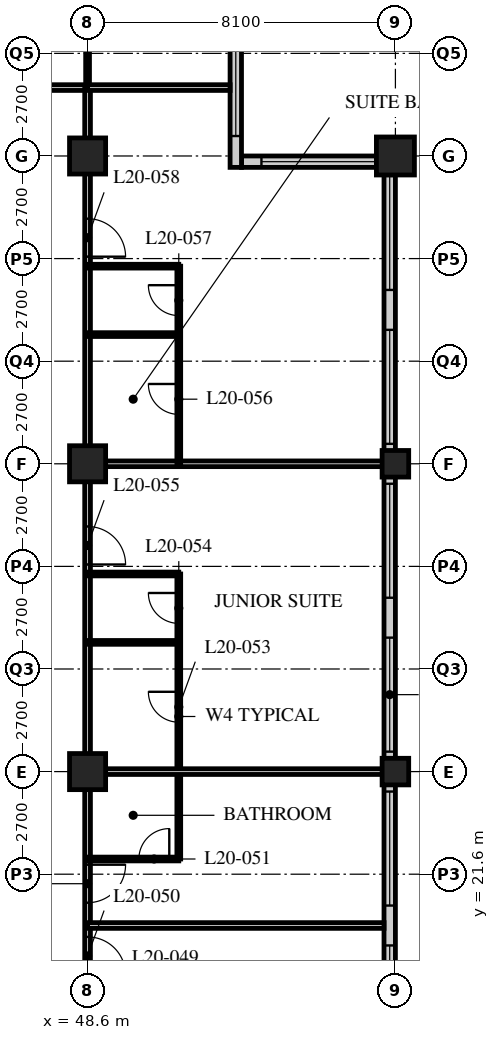
"""IFC4 building model, lengths in metres.
Left out: names, types, materials, properties, quantities, classifications, styles, units other than length and angle.
Written with IfcOpenShell. Run it as: python <this file> out.ifc"""

import sys

from ifc_helpers import new_model, si_unit, direction, frame, frame_2d, origin, origin_2d, place, context, subcontext, project, spatial, rectangle, hollow_rectangle, extrude, element, fill, save


model = new_model("IFC4")
c1 = context("Model", 3, precision=1e-05, world=origin(), true_north=direction((0.0, 1.0)))
c2 = subcontext(c1, "Body", "Model", "MODEL_VIEW")
j1 = project(units=[si_unit("LENGTHUNIT", "METRE"), si_unit("PLANEANGLEUNIT", "RADIAN")], contexts=[c1])
p1 = place(None, origin())
s1 = spatial("IfcSite", under=j1, at=p1, CompositionType="ELEMENT")
p2 = place(p1, origin())
s2 = spatial("IfcBuilding", under=s1, at=p2, CompositionType="ELEMENT")
p3 = place(p2, frame((0.0, 0.0, 80.6)))
s3 = spatial("IfcBuildingStorey", under=s2, at=p3, CompositionType="ELEMENT", Elevation=80.6)
for number, where, z_axis, x_axis in (
    (1, (48.6, 24.3, 0.0), (0.0, 0.0, 1.0), (1.0, 0.0, 0.0)),
    (2, (48.6, 32.4, 0.0), (0.0, 0.0, 1.0), (1.0, 0.0, 0.0)),
    (3, (48.6, 40.5, 0.0), (0.0, 0.0, 1.0), (1.0, 0.0, 0.0)),
):
    element("IfcColumn", number, at=place(p3, frame(where, z_axis=z_axis, x_axis=x_axis)), inside=s3, PredefinedType="COLUMN", context=c2, shape_type="SweptSolid", body=[
        extrude(hollow_rectangle(XDim=0.95, YDim=0.95, WallThickness=0.095, at=origin_2d()), origin(), (0.0, 0.0, 1.0), 3.4),
    ])
for number, where, z_axis, x_axis in (
    (4, (56.7, 24.3, 0.0), (0.0, 0.0, 1.0), (1.0, 0.0, 0.0)),
    (5, (56.7, 32.4, 0.0), (0.0, 0.0, 1.0), (1.0, 0.0, 0.0)),
):
    element("IfcColumn", number, at=place(p3, frame(where, z_axis=z_axis, x_axis=x_axis)), inside=s3, PredefinedType="COLUMN", context=c2, shape_type="SweptSolid", body=[
        extrude(hollow_rectangle(XDim=0.7, YDim=0.7, WallThickness=0.06, at=origin_2d()), origin(), (0.0, 0.0, 1.0), 3.4),
    ])
p4 = place(p3, frame((56.7, 40.5, 0.0), z_axis=(0.0, 0.0, 1.0), x_axis=(1.0, 0.0, 0.0)))
e6 = element("IfcColumn", 6, at=p4, inside=s3, PredefinedType="COLUMN", context=c2, shape_type="SweptSolid", body=[
    extrude(hollow_rectangle(XDim=1.0, YDim=1.0, WallThickness=0.1, at=origin_2d()), origin(), (0.0, 0.0, 1.0), 3.4),
])
p5 = place(p3, frame((56.55, 8.4, 0.0), z_axis=(0.0, 0.0, 1.0), x_axis=(0.0, 1.0, 0.0)))
e7 = element("IfcWall", 7, at=p5, inside=s3, PredefinedType="SOLIDWALL", context=c2, shape_type="SweptSolid", body=[
    extrude(rectangle(XDim=32.1, YDim=0.3, at=frame_2d((16.05, 0.0))), origin(), (0.0, 0.0, 1.0), 3.19),
])
p6 = place(p5, frame((0.225, 0.0, 0.9)))
e8 = element("IfcOpeningElement", 8, at=p6, cuts=e7, PredefinedType="OPENING", context=c2, shape_type="SweptSolid", body=[
    extrude(rectangle(XDim=3.0, YDim=1.5, at=frame_2d((1.5, 0.75))), frame((0.0, 0.16, 0.0), z_axis=(0.0, -1.0, 0.0), x_axis=(1.0, 0.0, 0.0)), (0.0, 0.0, 1.0), 0.32),
])
p7 = place(p5, frame((4.275, 0.0, 0.9)))
e9 = element("IfcOpeningElement", 9, at=p7, cuts=e7, PredefinedType="OPENING", context=c2, shape_type="SweptSolid", body=[
    extrude(rectangle(XDim=3.0, YDim=1.5, at=frame_2d((1.5, 0.75))), frame((0.0, 0.16, 0.0), z_axis=(0.0, -1.0, 0.0), x_axis=(1.0, 0.0, 0.0)), (0.0, 0.0, 1.0), 0.32),
])
p8 = place(p5, frame((8.325, 0.0, 0.9)))
e10 = element("IfcOpeningElement", 10, at=p8, cuts=e7, PredefinedType="OPENING", context=c2, shape_type="SweptSolid", body=[
    extrude(rectangle(XDim=3.0, YDim=1.5, at=frame_2d((1.5, 0.75))), frame((0.0, 0.16, 0.0), z_axis=(0.0, -1.0, 0.0), x_axis=(1.0, 0.0, 0.0)), (0.0, 0.0, 1.0), 0.32),
])
p9 = place(p5, frame((12.375, 0.0, 0.9)))
e11 = element("IfcOpeningElement", 11, at=p9, cuts=e7, PredefinedType="OPENING", context=c2, shape_type="SweptSolid", body=[
    extrude(rectangle(XDim=3.0, YDim=1.5, at=frame_2d((1.5, 0.75))), frame((0.0, 0.16, 0.0), z_axis=(0.0, -1.0, 0.0), x_axis=(1.0, 0.0, 0.0)), (0.0, 0.0, 1.0), 0.32),
])
p10 = place(p5, frame((16.425, 0.0, 0.9)))
e12 = element("IfcOpeningElement", 12, at=p10, cuts=e7, PredefinedType="OPENING", context=c2, shape_type="SweptSolid", body=[
    extrude(rectangle(XDim=3.0, YDim=1.5, at=frame_2d((1.5, 0.75))), frame((0.0, 0.16, 0.0), z_axis=(0.0, -1.0, 0.0), x_axis=(1.0, 0.0, 0.0)), (0.0, 0.0, 1.0), 0.32),
])
p11 = place(p5, frame((20.475, 0.0, 0.9)))
e13 = element("IfcOpeningElement", 13, at=p11, cuts=e7, PredefinedType="OPENING", context=c2, shape_type="SweptSolid", body=[
    extrude(rectangle(XDim=3.0, YDim=1.5, at=frame_2d((1.5, 0.75))), frame((0.0, 0.16, 0.0), z_axis=(0.0, -1.0, 0.0), x_axis=(1.0, 0.0, 0.0)), (0.0, 0.0, 1.0), 0.32),
])
p12 = place(p5, frame((24.525, 0.0, 0.9)))
e14 = element("IfcOpeningElement", 14, at=p12, cuts=e7, PredefinedType="OPENING", context=c2, shape_type="SweptSolid", body=[
    extrude(rectangle(XDim=3.0, YDim=1.5, at=frame_2d((1.5, 0.75))), frame((0.0, 0.16, 0.0), z_axis=(0.0, -1.0, 0.0), x_axis=(1.0, 0.0, 0.0)), (0.0, 0.0, 1.0), 0.32),
])
p13 = place(p5, frame((28.575, 0.0, 0.9)))
e15 = element("IfcOpeningElement", 15, at=p13, cuts=e7, PredefinedType="OPENING", context=c2, shape_type="SweptSolid", body=[
    extrude(rectangle(XDim=3.0, YDim=1.5, at=frame_2d((1.5, 0.75))), frame((0.0, 0.16, 0.0), z_axis=(0.0, -1.0, 0.0), x_axis=(1.0, 0.0, 0.0)), (0.0, 0.0, 1.0), 0.32),
])
p14 = place(p3, frame((56.4, 40.35, 0.0), z_axis=(0.0, 0.0, 1.0), x_axis=(-1.0, 0.0, 0.0)))
e16 = element("IfcWall", 16, at=p14, inside=s3, PredefinedType="SOLIDWALL", context=c2, shape_type="SweptSolid", body=[
    extrude(rectangle(XDim=3.75, YDim=0.3, at=frame_2d((1.875, 0.0))), origin(), (0.0, 0.0, 1.0), 3.19),
])
p15 = place(p14, frame((0.225, 0.0, 0.9)))
e17 = element("IfcOpeningElement", 17, at=p15, cuts=e16, PredefinedType="OPENING", context=c2, shape_type="SweptSolid", body=[
    extrude(rectangle(XDim=3.0, YDim=1.5, at=frame_2d((1.5, 0.75))), frame((0.0, 0.16, 0.0), z_axis=(0.0, -1.0, 0.0), x_axis=(1.0, 0.0, 0.0)), (0.0, 0.0, 1.0), 0.32),
])
p16 = place(p3, frame((52.5, 40.2, 0.0), z_axis=(0.0, 0.0, 1.0), x_axis=(0.0, 1.0, 0.0)))
e18 = element("IfcWall", 18, at=p16, inside=s3, PredefinedType="SOLIDWALL", context=c2, shape_type="SweptSolid", body=[
    extrude(rectangle(XDim=4.35, YDim=0.3, at=frame_2d((2.175, 0.0))), origin(), (0.0, 0.0, 1.0), 3.19),
])
p17 = place(p16, frame((0.825, 0.0, 0.9)))
e19 = element("IfcOpeningElement", 19, at=p17, cuts=e18, PredefinedType="OPENING", context=c2, shape_type="SweptSolid", body=[
    extrude(rectangle(XDim=3.0, YDim=1.5, at=frame_2d((1.5, 0.75))), frame((0.0, 0.16, 0.0), z_axis=(0.0, -1.0, 0.0), x_axis=(1.0, 0.0, 0.0)), (0.0, 0.0, 1.0), 0.32),
])
p18 = place(p3, frame((12.15, 42.3, 0.0), z_axis=(0.0, 0.0, 1.0), x_axis=(1.0, 0.0, 0.0)))
e20 = element("IfcWall", 20, at=p18, inside=s3, PredefinedType="PARTITIONING", context=c2, shape_type="SweptSolid", body=[
    extrude(rectangle(XDim=36.45, YDim=0.15, at=frame_2d((18.225, 0.0))), origin(), (0.0, 0.0, 1.0), 3.19),
])
p19 = place(p18, frame((9.5, 0.0, 0.0)))
e21 = element("IfcOpeningElement", 21, at=p19, cuts=e20, PredefinedType="OPENING", context=c2, shape_type="SweptSolid", body=[
    extrude(rectangle(XDim=1.0, YDim=2.1, at=frame_2d((0.5, 1.05))), frame((0.0, 0.085, 0.0), z_axis=(0.0, -1.0, 0.0), x_axis=(1.0, 0.0, 0.0)), (0.0, 0.0, 1.0), 0.17),
])
p20 = place(p18, frame((17.6, 0.0, 0.0)))
e22 = element("IfcOpeningElement", 22, at=p20, cuts=e20, PredefinedType="OPENING", context=c2, shape_type="SweptSolid", body=[
    extrude(rectangle(XDim=1.0, YDim=2.1, at=frame_2d((0.5, 1.05))), frame((0.0, 0.085, 0.0), z_axis=(0.0, -1.0, 0.0), x_axis=(1.0, 0.0, 0.0)), (0.0, 0.0, 1.0), 0.17),
])
p21 = place(p18, frame((22.7, 0.0, 0.0)))
e23 = element("IfcOpeningElement", 23, at=p21, cuts=e20, PredefinedType="OPENING", context=c2, shape_type="SweptSolid", body=[
    extrude(rectangle(XDim=1.0, YDim=2.1, at=frame_2d((0.5, 1.05))), frame((0.0, 0.085, 0.0), z_axis=(0.0, -1.0, 0.0), x_axis=(1.0, 0.0, 0.0)), (0.0, 0.0, 1.0), 0.17),
])
p22 = place(p18, frame((26.75, 0.0, 0.0)))
e24 = element("IfcOpeningElement", 24, at=p22, cuts=e20, PredefinedType="OPENING", context=c2, shape_type="SweptSolid", body=[
    extrude(rectangle(XDim=1.0, YDim=2.1, at=frame_2d((0.5, 1.05))), frame((0.0, 0.085, 0.0), z_axis=(0.0, -1.0, 0.0), x_axis=(1.0, 0.0, 0.0)), (0.0, 0.0, 1.0), 0.17),
])
p23 = place(p18, frame((30.8, 0.0, 0.0)))
e25 = element("IfcOpeningElement", 25, at=p23, cuts=e20, PredefinedType="OPENING", context=c2, shape_type="SweptSolid", body=[
    extrude(rectangle(XDim=1.0, YDim=2.1, at=frame_2d((0.5, 1.05))), frame((0.0, 0.085, 0.0), z_axis=(0.0, -1.0, 0.0), x_axis=(1.0, 0.0, 0.0)), (0.0, 0.0, 1.0), 0.17),
])
p24 = place(p18, frame((32.825, 0.0, 0.0)))
e26 = element("IfcOpeningElement", 26, at=p24, cuts=e20, PredefinedType="OPENING", context=c2, shape_type="SweptSolid", body=[
    extrude(rectangle(XDim=1.0, YDim=2.1, at=frame_2d((0.5, 1.05))), frame((0.0, 0.085, 0.0), z_axis=(0.0, -1.0, 0.0), x_axis=(1.0, 0.0, 0.0)), (0.0, 0.0, 1.0), 0.17),
])
p25 = place(p18, frame((2.375, 0.0, 0.0)))
e27 = element("IfcOpeningElement", 27, at=p25, cuts=e20, PredefinedType="OPENING", context=c2, shape_type="SweptSolid", body=[
    extrude(rectangle(XDim=1.0, YDim=2.1, at=frame_2d((0.5, 1.05))), frame((0.0, 0.085, 0.0), z_axis=(0.0, -1.0, 0.0), x_axis=(1.0, 0.0, 0.0)), (0.0, 0.0, 1.0), 0.17),
])
p26 = place(p3, frame((48.6, 16.2, 0.0), z_axis=(0.0, 0.0, 1.0), x_axis=(0.0, 1.0, 0.0)))
e28 = element("IfcWall", 28, at=p26, inside=s3, PredefinedType="PARTITIONING", context=c2, shape_type="SweptSolid", body=[
    extrude(rectangle(XDim=26.1, YDim=0.15, at=frame_2d((13.05, 0.0))), origin(), (0.0, 0.0, 1.0), 2.428),
])
p27 = place(p26, frame((2.75, 0.0, 0.0)))
e29 = element("IfcOpeningElement", 29, at=p27, cuts=e28, PredefinedType="OPENING", context=c2, shape_type="SweptSolid", body=[
    extrude(rectangle(XDim=1.0, YDim=2.1, at=frame_2d((0.5, 1.05))), frame((0.0, 0.085, 0.0), z_axis=(0.0, -1.0, 0.0), x_axis=(1.0, 0.0, 0.0)), (0.0, 0.0, 1.0), 0.17),
])
p28 = place(p26, frame((4.65, 0.0, 0.0)))
e30 = element("IfcOpeningElement", 30, at=p28, cuts=e28, PredefinedType="OPENING", context=c2, shape_type="SweptSolid", body=[
    extrude(rectangle(XDim=1.0, YDim=2.1, at=frame_2d((0.5, 1.05))), frame((0.0, 0.085, 0.0), z_axis=(0.0, -1.0, 0.0), x_axis=(1.0, 0.0, 0.0)), (0.0, 0.0, 1.0), 0.17),
])
p29 = place(p26, frame((13.55, 0.0, 0.0)))
e31 = element("IfcOpeningElement", 31, at=p29, cuts=e28, PredefinedType="OPENING", context=c2, shape_type="SweptSolid", body=[
    extrude(rectangle(XDim=1.0, YDim=2.1, at=frame_2d((0.5, 1.05))), frame((0.0, 0.085, 0.0), z_axis=(0.0, -1.0, 0.0), x_axis=(1.0, 0.0, 0.0)), (0.0, 0.0, 1.0), 0.17),
])
p30 = place(p26, frame((21.65, 0.0, 0.0)))
e32 = element("IfcOpeningElement", 32, at=p30, cuts=e28, PredefinedType="OPENING", context=c2, shape_type="SweptSolid", body=[
    extrude(rectangle(XDim=1.0, YDim=2.1, at=frame_2d((0.5, 1.05))), frame((0.0, 0.085, 0.0), z_axis=(0.0, -1.0, 0.0), x_axis=(1.0, 0.0, 0.0)), (0.0, 0.0, 1.0), 0.17),
])
p31 = place(p3, frame((48.6, 20.25, 0.0), z_axis=(0.0, 0.0, 1.0), x_axis=(1.0, 0.0, 0.0)))
e33 = element("IfcWall", 33, at=p31, inside=s3, PredefinedType="PARTITIONING", context=c2, shape_type="SweptSolid", body=[
    extrude(rectangle(XDim=7.8, YDim=0.15, at=frame_2d((3.9, 0.0))), origin(), (0.0, 0.0, 1.0), 3.19),
])
p32 = place(p3, frame((51.0, 22.0, 0.0), z_axis=(0.0, 0.0, 1.0), x_axis=(0.0, 1.0, 0.0)))
e34 = element("IfcWall", 34, at=p32, inside=s3, PredefinedType="PARTITIONING", context=c2, shape_type="SweptSolid", body=[
    extrude(rectangle(XDim=7.5, YDim=0.1, at=frame_2d((3.75, 0.0))), origin(), (0.0, 0.0, 1.0), 3.19),
])
p33 = place(p32, frame((3.6, 0.0, 0.0)))
e35 = element("IfcOpeningElement", 35, at=p33, cuts=e34, PredefinedType="OPENING", context=c2, shape_type="SweptSolid", body=[
    extrude(rectangle(XDim=0.8, YDim=2.1, at=frame_2d((0.4, 1.05))), frame((0.0, 0.06, 0.0), z_axis=(0.0, -1.0, 0.0), x_axis=(1.0, 0.0, 0.0)), (0.0, 0.0, 1.0), 0.12),
])
p34 = place(p32, frame((6.2, 0.0, 0.0)))
e36 = element("IfcOpeningElement", 36, at=p34, cuts=e34, PredefinedType="OPENING", context=c2, shape_type="SweptSolid", body=[
    extrude(rectangle(XDim=0.8, YDim=2.1, at=frame_2d((0.4, 1.05))), frame((0.0, 0.06, 0.0), z_axis=(0.0, -1.0, 0.0), x_axis=(1.0, 0.0, 0.0)), (0.0, 0.0, 1.0), 0.12),
])
p35 = place(p3, frame((48.6, 22.0, 0.0), z_axis=(0.0, 0.0, 1.0), x_axis=(1.0, 0.0, 0.0)))
e37 = element("IfcWall", 37, at=p35, inside=s3, PredefinedType="PARTITIONING", context=c2, shape_type="SweptSolid", body=[
    extrude(rectangle(XDim=2.4, YDim=0.1, at=frame_2d((1.2, 0.0))), origin(), (0.0, 0.0, 1.0), 3.19),
])
p36 = place(p35, frame((1.35, 0.0, 0.0)))
e38 = element("IfcOpeningElement", 38, at=p36, cuts=e37, PredefinedType="OPENING", context=c2, shape_type="SweptSolid", body=[
    extrude(rectangle(XDim=0.8, YDim=2.1, at=frame_2d((0.4, 1.05))), frame((0.0, 0.06, 0.0), z_axis=(0.0, -1.0, 0.0), x_axis=(1.0, 0.0, 0.0)), (0.0, 0.0, 1.0), 0.12),
])
p37 = place(p3, frame((48.6, 24.3, 0.0), z_axis=(0.0, 0.0, 1.0), x_axis=(1.0, 0.0, 0.0)))
e39 = element("IfcWall", 39, at=p37, inside=s3, PredefinedType="PARTITIONING", context=c2, shape_type="SweptSolid", body=[
    extrude(rectangle(XDim=7.8, YDim=0.15, at=frame_2d((3.9, 0.0))), origin(), (0.0, 0.0, 1.0), 2.428),
])
for number, where, z_axis, x_axis in (
    (40, (48.6, 27.7, 0.0), (0.0, 0.0, 1.0), (1.0, 0.0, 0.0)),
    (41, (48.6, 29.5, 0.0), (0.0, 0.0, 1.0), (1.0, 0.0, 0.0)),
):
    element("IfcWall", number, at=place(p3, frame(where, z_axis=z_axis, x_axis=x_axis)), inside=s3, PredefinedType="PARTITIONING", context=c2, shape_type="SweptSolid", body=[
        extrude(rectangle(XDim=2.4, YDim=0.1, at=frame_2d((1.2, 0.0))), origin(), (0.0, 0.0, 1.0), 3.19),
    ])
p38 = place(p3, frame((48.6, 32.4, 0.0), z_axis=(0.0, 0.0, 1.0), x_axis=(1.0, 0.0, 0.0)))
e42 = element("IfcWall", 42, at=p38, inside=s3, PredefinedType="PARTITIONING", context=c2, shape_type="SweptSolid", body=[
    extrude(rectangle(XDim=7.8, YDim=0.15, at=frame_2d((3.9, 0.0))), origin(), (0.0, 0.0, 1.0), 2.428),
])
p39 = place(p3, frame((51.0, 32.4, 0.0), z_axis=(0.0, 0.0, 1.0), x_axis=(0.0, 1.0, 0.0)))
e43 = element("IfcWall", 43, at=p39, inside=s3, PredefinedType="PARTITIONING", context=c2, shape_type="SweptSolid", body=[
    extrude(rectangle(XDim=5.2, YDim=0.1, at=frame_2d((2.6, 0.0))), origin(), (0.0, 0.0, 1.0), 3.19),
])
p40 = place(p39, frame((1.3, 0.0, 0.0)))
e44 = element("IfcOpeningElement", 44, at=p40, cuts=e43, PredefinedType="OPENING", context=c2, shape_type="SweptSolid", body=[
    extrude(rectangle(XDim=0.8, YDim=2.1, at=frame_2d((0.4, 1.05))), frame((0.0, 0.06, 0.0), z_axis=(0.0, -1.0, 0.0), x_axis=(1.0, 0.0, 0.0)), (0.0, 0.0, 1.0), 0.12),
])
p41 = place(p39, frame((3.9, 0.0, 0.0)))
e45 = element("IfcOpeningElement", 45, at=p41, cuts=e43, PredefinedType="OPENING", context=c2, shape_type="SweptSolid", body=[
    extrude(rectangle(XDim=0.8, YDim=2.1, at=frame_2d((0.4, 1.05))), frame((0.0, 0.06, 0.0), z_axis=(0.0, -1.0, 0.0), x_axis=(1.0, 0.0, 0.0)), (0.0, 0.0, 1.0), 0.12),
])
for number, where, z_axis, x_axis in (
    (46, (48.6, 35.8, 0.0), (0.0, 0.0, 1.0), (1.0, 0.0, 0.0)),
    (47, (48.6, 37.6, 0.0), (0.0, 0.0, 1.0), (1.0, 0.0, 0.0)),
):
    element("IfcWall", number, at=place(p3, frame(where, z_axis=z_axis, x_axis=x_axis)), inside=s3, PredefinedType="PARTITIONING", context=c2, shape_type="SweptSolid", body=[
        extrude(rectangle(XDim=2.4, YDim=0.1, at=frame_2d((1.2, 0.0))), origin(), (0.0, 0.0, 1.0), 3.19),
    ])
p42 = place(p3, frame((48.6, 42.3, 0.0), z_axis=(0.0, 0.0, 1.0), x_axis=(0.0, 1.0, 0.0)))
e48 = element("IfcWall", 48, at=p42, inside=s3, PredefinedType="PARTITIONING", context=c2, shape_type="SweptSolid", body=[
    extrude(rectangle(XDim=1.95, YDim=0.1, at=frame_2d((0.975, 0.0))), origin(), (0.0, 0.0, 1.0), 2.428),
])
p43 = place(p3, frame((48.6, 42.3, 0.0), z_axis=(0.0, 0.0, 1.0), x_axis=(1.0, 0.0, 0.0)))
e49 = element("IfcWall", 49, at=p43, inside=s3, PredefinedType="PARTITIONING", context=c2, shape_type="SweptSolid", body=[
    extrude(rectangle(XDim=3.75, YDim=0.15, at=frame_2d((1.875, 0.0))), origin(), (0.0, 0.0, 1.0), 3.19),
])
p44 = place(p8, origin())
e50 = element("IfcWindow", 50, at=p44, inside=s3, PartitioningType="SINGLE_PANEL", PredefinedType="WINDOW", context=c2, shape_type="SweptSolid", body=[
    extrude(rectangle(XDim=3.0, YDim=1.5, at=frame_2d((1.5, 0.75))), frame((0.0, 0.03, 0.0), z_axis=(0.0, -1.0, 0.0), x_axis=(1.0, 0.0, 0.0)), (0.0, 0.0, 1.0), 0.06),
])
fill(e10, e50)
p45 = place(p9, origin())
e51 = element("IfcWindow", 51, at=p45, inside=s3, PartitioningType="SINGLE_PANEL", PredefinedType="WINDOW", context=c2, shape_type="SweptSolid", body=[
    extrude(rectangle(XDim=3.0, YDim=1.5, at=frame_2d((1.5, 0.75))), frame((0.0, 0.03, 0.0), z_axis=(0.0, -1.0, 0.0), x_axis=(1.0, 0.0, 0.0)), (0.0, 0.0, 1.0), 0.06),
])
fill(e11, e51)
p46 = place(p10, origin())
e52 = element("IfcWindow", 52, at=p46, inside=s3, PartitioningType="SINGLE_PANEL", PredefinedType="WINDOW", context=c2, shape_type="SweptSolid", body=[
    extrude(rectangle(XDim=3.0, YDim=1.5, at=frame_2d((1.5, 0.75))), frame((0.0, 0.03, 0.0), z_axis=(0.0, -1.0, 0.0), x_axis=(1.0, 0.0, 0.0)), (0.0, 0.0, 1.0), 0.06),
])
fill(e12, e52)
p47 = place(p11, origin())
e53 = element("IfcWindow", 53, at=p47, inside=s3, PartitioningType="SINGLE_PANEL", PredefinedType="WINDOW", context=c2, shape_type="SweptSolid", body=[
    extrude(rectangle(XDim=3.0, YDim=1.5, at=frame_2d((1.5, 0.75))), frame((0.0, 0.03, 0.0), z_axis=(0.0, -1.0, 0.0), x_axis=(1.0, 0.0, 0.0)), (0.0, 0.0, 1.0), 0.06),
])
fill(e13, e53)
p48 = place(p12, origin())
e54 = element("IfcWindow", 54, at=p48, inside=s3, PartitioningType="SINGLE_PANEL", PredefinedType="WINDOW", context=c2, shape_type="SweptSolid", body=[
    extrude(rectangle(XDim=3.0, YDim=1.5, at=frame_2d((1.5, 0.75))), frame((0.0, 0.03, 0.0), z_axis=(0.0, -1.0, 0.0), x_axis=(1.0, 0.0, 0.0)), (0.0, 0.0, 1.0), 0.06),
])
fill(e14, e54)
p49 = place(p13, origin())
e55 = element("IfcWindow", 55, at=p49, inside=s3, PartitioningType="SINGLE_PANEL", PredefinedType="WINDOW", context=c2, shape_type="SweptSolid", body=[
    extrude(rectangle(XDim=3.0, YDim=1.5, at=frame_2d((1.5, 0.75))), frame((0.0, 0.03, 0.0), z_axis=(0.0, -1.0, 0.0), x_axis=(1.0, 0.0, 0.0)), (0.0, 0.0, 1.0), 0.06),
])
fill(e15, e55)
p50 = place(p15, origin())
e56 = element("IfcWindow", 56, at=p50, inside=s3, PartitioningType="SINGLE_PANEL", PredefinedType="WINDOW", context=c2, shape_type="SweptSolid", body=[
    extrude(rectangle(XDim=3.0, YDim=1.5, at=frame_2d((1.5, 0.75))), frame((0.0, 0.03, 0.0), z_axis=(0.0, -1.0, 0.0), x_axis=(1.0, 0.0, 0.0)), (0.0, 0.0, 1.0), 0.06),
])
fill(e17, e56)
p51 = place(p17, origin())
e57 = element("IfcWindow", 57, at=p51, inside=s3, PartitioningType="SINGLE_PANEL", PredefinedType="WINDOW", context=c2, shape_type="SweptSolid", body=[
    extrude(rectangle(XDim=3.0, YDim=1.5, at=frame_2d((1.5, 0.75))), frame((0.0, 0.03, 0.0), z_axis=(0.0, -1.0, 0.0), x_axis=(1.0, 0.0, 0.0)), (0.0, 0.0, 1.0), 0.06),
])
fill(e19, e57)
p52 = place(p27, origin())
e58 = element("IfcDoor", 58, at=p52, inside=s3, OperationType="SINGLE_SWING_RIGHT", PredefinedType="DOOR", context=c2, shape_type="SweptSolid", body=[
    extrude(rectangle(XDim=1.0, YDim=2.1, at=frame_2d((0.5, 1.05))), frame((0.0, 0.025, 0.0), z_axis=(0.0, -1.0, 0.0), x_axis=(1.0, 0.0, 0.0)), (0.0, 0.0, 1.0), 0.05),
])
fill(e29, e58)
p53 = place(p36, origin())
e59 = element("IfcDoor", 59, at=p53, inside=s3, OperationType="SINGLE_SWING_RIGHT", PredefinedType="DOOR", context=c2, shape_type="SweptSolid", body=[
    extrude(rectangle(XDim=0.8, YDim=2.1, at=frame_2d((0.4, 1.05))), frame((0.0, 0.025, 0.0), z_axis=(0.0, -1.0, 0.0), x_axis=(1.0, 0.0, 0.0)), (0.0, 0.0, 1.0), 0.05),
])
fill(e38, e59)
p54 = place(p28, origin())
e60 = element("IfcDoor", 60, at=p54, inside=s3, OperationType="SINGLE_SWING_LEFT", PredefinedType="DOOR", context=c2, shape_type="SweptSolid", body=[
    extrude(rectangle(XDim=1.0, YDim=2.1, at=frame_2d((0.5, 1.05))), frame((0.0, 0.025, 0.0), z_axis=(0.0, -1.0, 0.0), x_axis=(1.0, 0.0, 0.0)), (0.0, 0.0, 1.0), 0.05),
])
fill(e30, e60)
p55 = place(p33, origin())
e61 = element("IfcDoor", 61, at=p55, inside=s3, OperationType="SINGLE_SWING_RIGHT", PredefinedType="DOOR", context=c2, shape_type="SweptSolid", body=[
    extrude(rectangle(XDim=0.8, YDim=2.1, at=frame_2d((0.4, 1.05))), frame((0.0, 0.025, 0.0), z_axis=(0.0, -1.0, 0.0), x_axis=(1.0, 0.0, 0.0)), (0.0, 0.0, 1.0), 0.05),
])
fill(e35, e61)
p56 = place(p34, origin())
e62 = element("IfcDoor", 62, at=p56, inside=s3, OperationType="SINGLE_SWING_RIGHT", PredefinedType="DOOR", context=c2, shape_type="SweptSolid", body=[
    extrude(rectangle(XDim=0.8, YDim=2.1, at=frame_2d((0.4, 1.05))), frame((0.0, 0.025, 0.0), z_axis=(0.0, -1.0, 0.0), x_axis=(1.0, 0.0, 0.0)), (0.0, 0.0, 1.0), 0.05),
])
fill(e36, e62)
p57 = place(p29, origin())
e63 = element("IfcDoor", 63, at=p57, inside=s3, OperationType="SINGLE_SWING_RIGHT", PredefinedType="DOOR", context=c2, shape_type="SweptSolid", body=[
    extrude(rectangle(XDim=1.0, YDim=2.1, at=frame_2d((0.5, 1.05))), frame((0.0, 0.025, 0.0), z_axis=(0.0, -1.0, 0.0), x_axis=(1.0, 0.0, 0.0)), (0.0, 0.0, 1.0), 0.05),
])
fill(e31, e63)
p58 = place(p40, origin())
e64 = element("IfcDoor", 64, at=p58, inside=s3, OperationType="SINGLE_SWING_RIGHT", PredefinedType="DOOR", context=c2, shape_type="SweptSolid", body=[
    extrude(rectangle(XDim=0.8, YDim=2.1, at=frame_2d((0.4, 1.05))), frame((0.0, 0.025, 0.0), z_axis=(0.0, -1.0, 0.0), x_axis=(1.0, 0.0, 0.0)), (0.0, 0.0, 1.0), 0.05),
])
fill(e44, e64)
p59 = place(p41, origin())
e65 = element("IfcDoor", 65, at=p59, inside=s3, OperationType="SINGLE_SWING_RIGHT", PredefinedType="DOOR", context=c2, shape_type="SweptSolid", body=[
    extrude(rectangle(XDim=0.8, YDim=2.1, at=frame_2d((0.4, 1.05))), frame((0.0, 0.025, 0.0), z_axis=(0.0, -1.0, 0.0), x_axis=(1.0, 0.0, 0.0)), (0.0, 0.0, 1.0), 0.05),
])
fill(e45, e65)
p60 = place(p30, origin())
e66 = element("IfcDoor", 66, at=p60, inside=s3, OperationType="SINGLE_SWING_RIGHT", PredefinedType="DOOR", context=c2, shape_type="SweptSolid", body=[
    extrude(rectangle(XDim=1.0, YDim=2.1, at=frame_2d((0.5, 1.05))), frame((0.0, 0.025, 0.0), z_axis=(0.0, -1.0, 0.0), x_axis=(1.0, 0.0, 0.0)), (0.0, 0.0, 1.0), 0.05),
])
fill(e32, e66)
save(model, sys.argv[1])
